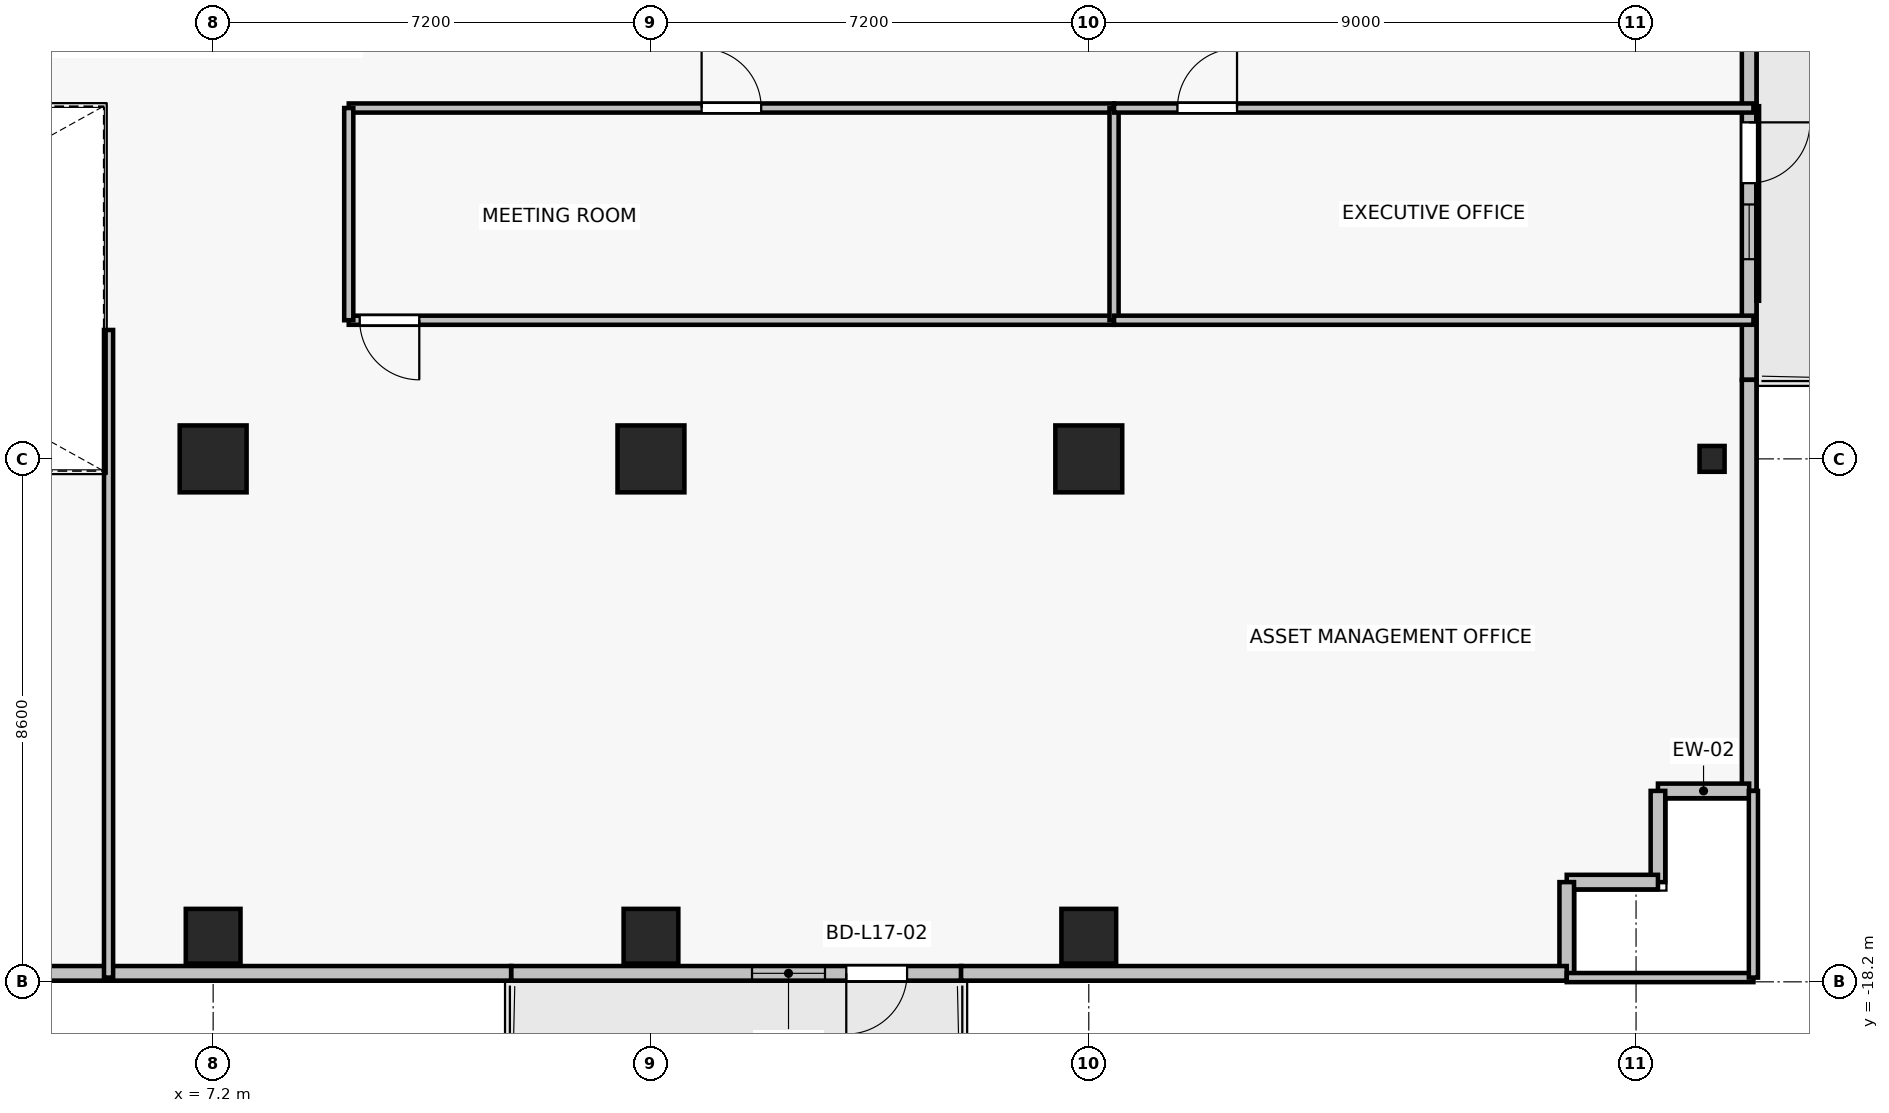
"""IFC4 building model, lengths in metres.
Left out: names, types, materials, properties, quantities, classifications, styles, units other than length and angle.
Written with IfcOpenShell. Run it as: python <this file> out.ifc"""

import sys

from ifc_helpers import new_model, si_unit, direction, frame, frame_2d, origin, origin_2d, place, context, subcontext, project, spatial, rectangle, i_section, extrude, source, transform, mapped, element, fill, save


model = new_model("IFC4")
c1 = context("Model", 3, precision=1e-05, world=origin(), true_north=direction((0.0, 1.0)))
c2 = subcontext(c1, "Body", "Model", "MODEL_VIEW")
j1 = project(units=[si_unit("LENGTHUNIT", "METRE"), si_unit("PLANEANGLEUNIT", "RADIAN")], contexts=[c1])
p1 = place(None, origin())
s1 = spatial("IfcSite", under=j1, at=p1, CompositionType="ELEMENT")
p2 = place(p1, origin())
s2 = spatial("IfcBuilding", under=s1, at=p2, CompositionType="ELEMENT")
p3 = place(p2, frame((0.0, 0.0, 63.7)))
s3 = spatial("IfcBuildingStorey", under=s2, at=p3, CompositionType="ELEMENT", Elevation=63.7)
for number, where, z_axis, x_axis in (
    (1, (7.2, -9.6, 0.0), (0.0, 0.0, 1.0), (1.0, 0.0, 0.0)),
    (2, (14.4, -9.6, 0.0), (0.0, 0.0, 1.0), (1.0, 0.0, 0.0)),
    (3, (21.6, -9.6, 0.0), (0.0, 0.0, 1.0), (1.0, 0.0, 0.0)),
):
    element("IfcColumn", number, at=place(p3, frame(where, z_axis=z_axis, x_axis=x_axis)), inside=s3, PredefinedType="COLUMN", context=c2, shape_type="SweptSolid", body=[
        extrude(rectangle(XDim=1.1, YDim=1.1, at=origin_2d()), origin(), (0.0, 0.0, 1.0), 3.3),
    ])
for number, where, z_axis, x_axis in (
    (4, (7.2, -17.45, 0.0), (0.0, 0.0, 1.0), (1.0, 0.0, 0.0)),
    (5, (14.4, -17.45, 0.0), (0.0, 0.0, 1.0), (1.0, 0.0, 0.0)),
    (6, (21.6, -17.45, 0.0), (0.0, 0.0, 1.0), (1.0, 0.0, 0.0)),
):
    element("IfcColumn", number, at=place(p3, frame(where, z_axis=z_axis, x_axis=x_axis)), inside=s3, PredefinedType="COLUMN", context=c2, shape_type="SweptSolid", body=[
        extrude(rectangle(XDim=0.9, YDim=0.9, at=origin_2d()), origin(), (0.0, 0.0, 1.0), 3.3),
    ])
p4 = place(p3, frame((31.85, -9.6, 0.0), z_axis=(0.0, 0.0, 1.0), x_axis=(1.0, 0.0, 0.0)))
e7 = element("IfcColumn", 7, at=p4, inside=s3, PredefinedType="COLUMN", context=c2, shape_type="SweptSolid", body=[
    extrude(i_section(OverallWidth=0.412, OverallDepth=0.425, WebThickness=0.026, FlangeThickness=0.039, FilletRadius=0.015, at=origin_2d()), origin(), (0.0, 0.0, 1.0), 3.3),
])
p5 = place(p3, frame((19.5, -18.06, 0.0), z_axis=(0.0, 0.0, 1.0), x_axis=(-1.0, 0.0, 0.0)))
e8 = element("IfcWall", 8, at=p5, inside=s3, PredefinedType="SOLIDWALL", context=c2, shape_type="SweptSolid", body=[
    extrude(rectangle(XDim=7.4, YDim=0.24, at=frame_2d((3.7, 0.0))), origin(), (0.0, 0.0, 1.0), 2.665),
])
p6 = place(p5, frame((0.888, 0.0, 0.0)))
e9 = element("IfcOpeningElement", 9, at=p6, cuts=e8, PredefinedType="OPENING", context=c2, shape_type="SweptSolid", body=[
    extrude(rectangle(XDim=1.0, YDim=2.2, at=frame_2d((0.5, 1.1))), frame((0.0, 0.13, 0.0), z_axis=(0.0, -1.0, 0.0), x_axis=(1.0, 0.0, 0.0)), (0.0, 0.0, 1.0), 0.26),
])
p7 = place(p5, frame((2.238, 0.0, 0.85)))
e10 = element("IfcOpeningElement", 10, at=p7, cuts=e8, PredefinedType="OPENING", context=c2, shape_type="SweptSolid", body=[
    extrude(rectangle(XDim=1.2, YDim=1.5, at=frame_2d((0.6, 0.75))), frame((0.0, 0.13, 0.0), z_axis=(0.0, -1.0, 0.0), x_axis=(1.0, 0.0, 0.0)), (0.0, 0.0, 1.0), 0.26),
])
p8 = place(p3, frame((32.46, -2.5, 0.0), z_axis=(0.0, 0.0, 1.0), x_axis=(0.0, -1.0, 0.0)))
e11 = element("IfcWall", 11, at=p8, inside=s3, PredefinedType="SOLIDWALL", context=c2, shape_type="SweptSolid", body=[
    extrude(rectangle(XDim=5.8, YDim=0.24, at=frame_2d((2.9, 0.0))), origin(), (0.0, 0.0, 1.0), 3.075),
])
p9 = place(p8, frame((1.566, 0.0, 0.0)))
e12 = element("IfcOpeningElement", 12, at=p9, cuts=e11, PredefinedType="OPENING", context=c2, shape_type="SweptSolid", body=[
    extrude(rectangle(XDim=1.0, YDim=2.2, at=frame_2d((0.5, 1.1))), frame((0.0, 0.13, 0.0), z_axis=(0.0, -1.0, 0.0), x_axis=(1.0, 0.0, 0.0)), (0.0, 0.0, 1.0), 0.26),
])
p10 = place(p8, frame((2.916, 0.0, 0.85)))
e13 = element("IfcOpeningElement", 13, at=p10, cuts=e11, PredefinedType="OPENING", context=c2, shape_type="SweptSolid", body=[
    extrude(rectangle(XDim=0.9, YDim=1.35, at=frame_2d((0.45, 0.675))), frame((0.0, 0.13, 0.0), z_axis=(0.0, -1.0, 0.0), x_axis=(1.0, 0.0, 0.0)), (0.0, 0.0, 1.0), 0.26),
])
p11 = place(p3, frame((32.46, -15.06, 0.0), z_axis=(0.0, 0.0, 1.0), x_axis=(0.0, 1.0, 0.0)))
e14 = element("IfcWall", 14, at=p11, inside=s3, PredefinedType="SOLIDWALL", context=c2, shape_type="SweptSolid", body=[
    extrude(rectangle(XDim=6.76, YDim=0.24, at=frame_2d((3.38, 0.0))), origin(), (0.0, 0.0, 1.0), 3.075),
])
for number, where, z_axis, x_axis in (
    (15, (30.96, -15.06, 0.0), (0.0, 0.0, 1.0), (1.0, 0.0, 0.0)),
    (16, (30.96, -16.56, 0.0), (0.0, 0.0, 1.0), (0.0, 1.0, 0.0)),
    (17, (29.46, -16.56, 0.0), (0.0, 0.0, 1.0), (1.0, 0.0, 0.0)),
    (18, (29.46, -18.06, 0.0), (0.0, 0.0, 1.0), (0.0, 1.0, 0.0)),
):
    element("IfcWall", number, at=place(p3, frame(where, z_axis=z_axis, x_axis=x_axis)), inside=s3, PredefinedType="SOLIDWALL", context=c2, shape_type="SweptSolid", body=[
        extrude(rectangle(XDim=1.5, YDim=0.24, at=frame_2d((0.75, 0.0))), origin(), (0.0, 0.0, 1.0), 3.075),
    ])
p12 = place(p3, frame((19.5, -18.06, 0.0), z_axis=(0.0, 0.0, 1.0), x_axis=(1.0, 0.0, 0.0)))
e19 = element("IfcWall", 19, at=p12, inside=s3, PredefinedType="SOLIDWALL", context=c2, shape_type="SweptSolid", body=[
    extrude(rectangle(XDim=9.96, YDim=0.24, at=frame_2d((4.98, 0.0))), origin(), (0.0, 0.0, 1.0), 2.665),
])
p13 = place(p3, frame((3.34, -18.06, 0.0), z_axis=(0.0, 0.0, 1.0), x_axis=(1.0, 0.0, 0.0)))
e20 = element("IfcWall", 20, at=p13, inside=s3, PredefinedType="SOLIDWALL", context=c2, shape_type="SweptSolid", body=[
    extrude(rectangle(XDim=8.76, YDim=0.24, at=frame_2d((4.38, 0.0))), origin(), (0.0, 0.0, 1.0), 3.075),
])
p14 = place(p3, frame((22.015, -7.32, 0.0), z_axis=(0.0, 0.0, 1.0), x_axis=(-1.0, 0.0, 0.0)))
e21 = element("IfcWall", 21, at=p14, inside=s3, PredefinedType="PARTITIONING", context=c2, shape_type="SweptSolid", body=[
    extrude(rectangle(XDim=12.585, YDim=0.15, at=frame_2d((6.293, 0.0))), origin(), (0.0, 0.0, 1.0), 2.465),
])
p15 = place(p14, frame((11.426, 0.0, 0.0)))
e22 = element("IfcOpeningElement", 22, at=p15, cuts=e21, PredefinedType="OPENING", context=c2, shape_type="SweptSolid", body=[
    extrude(rectangle(XDim=0.98, YDim=2.15, at=frame_2d((0.49, 1.075))), frame((0.0, 0.085, 0.0), z_axis=(0.0, -1.0, 0.0), x_axis=(1.0, 0.0, 0.0)), (0.0, 0.0, 1.0), 0.17),
])
p16 = place(p3, frame((9.43, -3.83, 0.0), z_axis=(0.0, 0.0, 1.0), x_axis=(1.0, 0.0, 0.0)))
e23 = element("IfcWall", 23, at=p16, inside=s3, PredefinedType="PARTITIONING", context=c2, shape_type="SweptSolid", body=[
    extrude(rectangle(XDim=12.585, YDim=0.15, at=frame_2d((6.293, 0.0))), origin(), (0.0, 0.0, 1.0), 2.465),
])
p17 = place(p16, frame((5.803, 0.0, 0.0)))
e24 = element("IfcOpeningElement", 24, at=p17, cuts=e23, PredefinedType="OPENING", context=c2, shape_type="SweptSolid", body=[
    extrude(rectangle(XDim=0.98, YDim=2.15, at=frame_2d((0.49, 1.075))), frame((0.0, 0.085, 0.0), z_axis=(0.0, -1.0, 0.0), x_axis=(1.0, 0.0, 0.0)), (0.0, 0.0, 1.0), 0.17),
])
for number, where, z_axis, x_axis in (
    (25, (9.43, -7.32, 0.0), (0.0, 0.0, 1.0), (0.0, 1.0, 0.0)),
    (26, (22.015, -3.83, 0.0), (0.0, 0.0, 1.0), (0.0, -1.0, 0.0)),
):
    element("IfcWall", number, at=place(p3, frame(where, z_axis=z_axis, x_axis=x_axis)), inside=s3, PredefinedType="PARTITIONING", context=c2, shape_type="SweptSolid", body=[
        extrude(rectangle(XDim=3.49, YDim=0.15, at=frame_2d((1.745, 0.0))), origin(), (0.0, 0.0, 1.0), 2.565),
    ])
p18 = place(p3, frame((32.53, -7.32, 0.0), z_axis=(0.0, 0.0, 1.0), x_axis=(-1.0, 0.0, 0.0)))
e27 = element("IfcWall", 27, at=p18, inside=s3, PredefinedType="PARTITIONING", context=c2, shape_type="SweptSolid", body=[
    extrude(rectangle(XDim=10.515, YDim=0.15, at=frame_2d((5.257, 0.0))), origin(), (0.0, 0.0, 1.0), 2.465),
])
p19 = place(p3, frame((22.015, -3.83, 0.0), z_axis=(0.0, 0.0, 1.0), x_axis=(1.0, 0.0, 0.0)))
e28 = element("IfcWall", 28, at=p19, inside=s3, PredefinedType="PARTITIONING", context=c2, shape_type="SweptSolid", body=[
    extrude(rectangle(XDim=10.515, YDim=0.15, at=frame_2d((5.257, 0.0))), origin(), (0.0, 0.0, 1.0), 2.465),
])
p20 = place(p19, frame((1.042, 0.0, 0.0)))
e29 = element("IfcOpeningElement", 29, at=p20, cuts=e28, PredefinedType="OPENING", context=c2, shape_type="SweptSolid", body=[
    extrude(rectangle(XDim=0.98, YDim=2.15, at=frame_2d((0.49, 1.075))), frame((0.0, 0.085, 0.0), z_axis=(0.0, -1.0, 0.0), x_axis=(1.0, 0.0, 0.0)), (0.0, 0.0, 1.0), 0.17),
])
p21 = place(p3, frame((32.53, -18.13, 0.0), z_axis=(0.0, 0.0, 1.0), x_axis=(-1.0, 0.0, 0.0)))
e30 = element("IfcWall", 30, at=p21, inside=s3, PredefinedType="PARTITIONING", context=c2, shape_type="SweptSolid", body=[
    extrude(rectangle(XDim=3.07, YDim=0.15, at=frame_2d((1.535, 0.0))), origin(), (0.0, 0.0, 1.0), 2.665),
])
p22 = place(p3, frame((5.48, -18.13, 0.0), z_axis=(0.0, 0.0, 1.0), x_axis=(0.0, 1.0, 0.0)))
e31 = element("IfcWall", 31, at=p22, inside=s3, PredefinedType="PARTITIONING", context=c2, shape_type="SweptSolid", body=[
    extrude(rectangle(XDim=10.65, YDim=0.15, at=frame_2d((5.325, 0.0))), origin(), (0.0, 0.0, 1.0), 2.465),
])
p23 = place(p3, frame((32.53, -15.06, 0.0), z_axis=(0.0, 0.0, 1.0), x_axis=(0.0, -1.0, 0.0)))
e32 = element("IfcWall", 32, at=p23, inside=s3, PredefinedType="PARTITIONING", context=c2, shape_type="SweptSolid", body=[
    extrude(rectangle(XDim=3.07, YDim=0.15, at=frame_2d((1.535, 0.0))), origin(), (0.0, 0.0, 1.0), 3.075),
])
m1 = source(origin(), c2, "Body", "SweptSolid", [
    extrude(rectangle(XDim=1.0, YDim=2.2, at=frame_2d((0.5, 1.1))), frame((0.0, 0.025, 0.0), z_axis=(0.0, -1.0, 0.0), x_axis=(1.0, 0.0, 0.0)), (0.0, 0.0, 1.0), 0.05),
])
p24 = place(p6, origin())
e33 = element("IfcDoor", 33, at=p24, inside=s3, OperationType="SINGLE_SWING_RIGHT", PredefinedType="DOOR", context=c2, shape_type="MappedRepresentation", body=[
    mapped(m1, transform((0.0, 0.0, 0.0), x_axis=(1.0, 0.0, 0.0), y_axis=(0.0, 1.0, 0.0), z_axis=(0.0, 0.0, 1.0), scale=1.0)),
])
fill(e9, e33)
m2 = source(origin(), c2, "Body", "SweptSolid", [
    extrude(rectangle(XDim=1.2, YDim=1.5, at=frame_2d((0.6, 0.75))), frame((0.0, 0.03, 0.0), z_axis=(0.0, -1.0, 0.0), x_axis=(1.0, 0.0, 0.0)), (0.0, 0.0, 1.0), 0.06),
])
p25 = place(p7, origin())
e34 = element("IfcWindow", 34, at=p25, inside=s3, PartitioningType="SINGLE_PANEL", PredefinedType="WINDOW", context=c2, shape_type="MappedRepresentation", body=[
    mapped(m2, transform((0.0, 0.0, 0.0), x_axis=(1.0, 0.0, 0.0), y_axis=(0.0, 1.0, 0.0), z_axis=(0.0, 0.0, 1.0), scale=1.0)),
])
fill(e10, e34)
p26 = place(p9, origin())
e35 = element("IfcDoor", 35, at=p26, inside=s3, OperationType="SINGLE_SWING_LEFT", PredefinedType="DOOR", context=c2, shape_type="MappedRepresentation", body=[
    mapped(m1, transform((0.0, 0.0, 0.0), x_axis=(1.0, 0.0, 0.0), y_axis=(0.0, 1.0, 0.0), z_axis=(0.0, 0.0, 1.0), scale=1.0)),
])
fill(e12, e35)
m3 = source(origin(), c2, "Body", "SweptSolid", [
    extrude(rectangle(XDim=0.9, YDim=1.35, at=frame_2d((0.45, 0.675))), frame((0.0, 0.03, 0.0), z_axis=(0.0, -1.0, 0.0), x_axis=(1.0, 0.0, 0.0)), (0.0, 0.0, 1.0), 0.06),
])
p27 = place(p10, origin())
e36 = element("IfcWindow", 36, at=p27, inside=s3, PartitioningType="SINGLE_PANEL", PredefinedType="WINDOW", context=c2, shape_type="MappedRepresentation", body=[
    mapped(m3, transform((0.0, 0.0, 0.0), x_axis=(1.0, 0.0, 0.0), y_axis=(0.0, 1.0, 0.0), z_axis=(0.0, 0.0, 1.0), scale=1.0)),
])
fill(e13, e36)
m4 = source(origin(), c2, "Body", "SweptSolid", [
    extrude(rectangle(XDim=0.98, YDim=2.15, at=frame_2d((0.49, 1.075))), frame((0.0, 0.025, 0.0), z_axis=(0.0, -1.0, 0.0), x_axis=(1.0, 0.0, 0.0)), (0.0, 0.0, 1.0), 0.05),
])
p28 = place(p17, origin())
e37 = element("IfcDoor", 37, at=p28, inside=s3, OperationType="SINGLE_SWING_LEFT", PredefinedType="DOOR", context=c2, shape_type="MappedRepresentation", body=[
    mapped(m4, transform((0.0, 0.0, 0.0), x_axis=(1.0, 0.0, 0.0), y_axis=(0.0, 1.0, 0.0), z_axis=(0.0, 0.0, 1.0), scale=1.0)),
])
fill(e24, e37)
p29 = place(p20, origin())
e38 = element("IfcDoor", 38, at=p29, inside=s3, OperationType="SINGLE_SWING_RIGHT", PredefinedType="DOOR", context=c2, shape_type="MappedRepresentation", body=[
    mapped(m4, transform((0.0, 0.0, 0.0), x_axis=(1.0, 0.0, 0.0), y_axis=(0.0, 1.0, 0.0), z_axis=(0.0, 0.0, 1.0), scale=1.0)),
])
fill(e29, e38)
p30 = place(p15, origin())
e39 = element("IfcDoor", 39, at=p30, inside=s3, OperationType="SINGLE_SWING_LEFT", PredefinedType="DOOR", context=c2, shape_type="MappedRepresentation", body=[
    mapped(m4, transform((0.0, 0.0, 0.0), x_axis=(1.0, 0.0, 0.0), y_axis=(0.0, 1.0, 0.0), z_axis=(0.0, 0.0, 1.0), scale=1.0)),
])
fill(e22, e39)
save(model, sys.argv[1])
